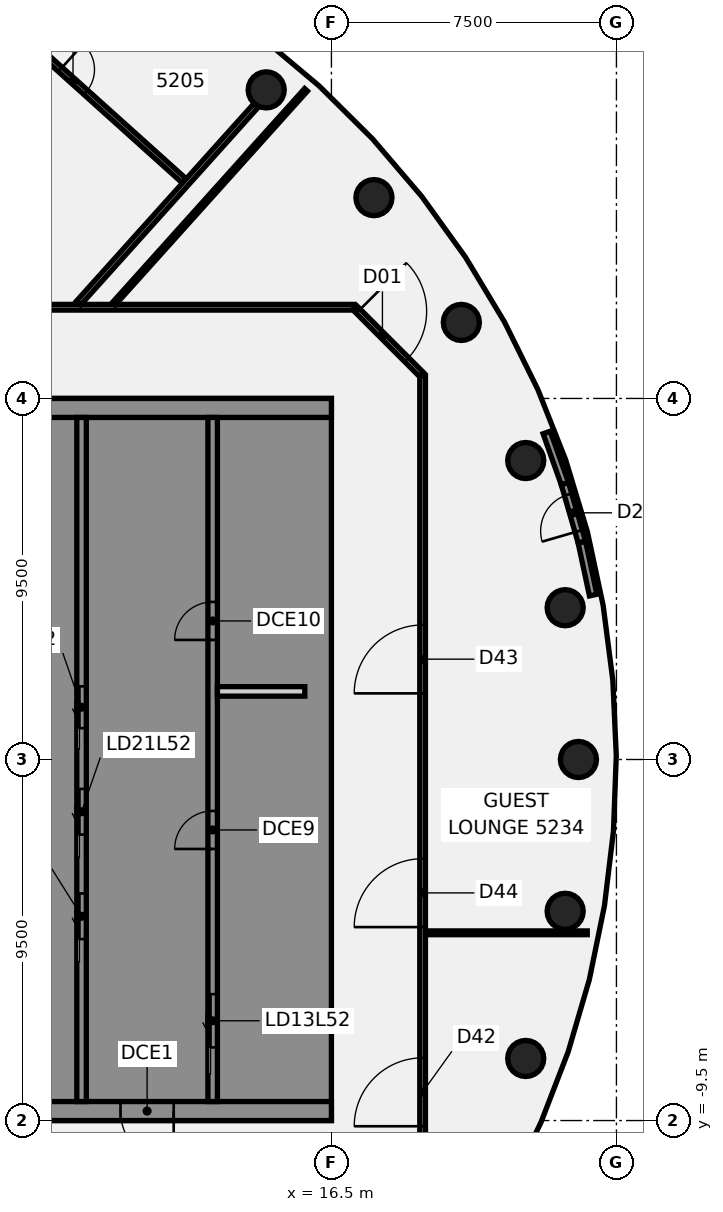
"""IFC4 building model, lengths in metres.
Left out: names, types, materials, properties, quantities, classifications, styles, units other than length and angle.
Written with IfcOpenShell. Run it as: python <this file> out.ifc"""

import sys

from ifc_helpers import new_model, si_unit, direction, frame, frame_2d, origin, origin_2d, place, context, subcontext, project, spatial, polyline, rectangle, circle, outline, extrude, element, fill, save


model = new_model("IFC4")
c1 = context("Model", 3, precision=1e-05, world=origin(), true_north=direction((0.0, 1.0)))
c2 = subcontext(c1, "Body", "Model", "MODEL_VIEW")
j1 = project(units=[si_unit("LENGTHUNIT", "METRE"), si_unit("PLANEANGLEUNIT", "RADIAN")], contexts=[c1])
p1 = place(None, origin())
s1 = spatial("IfcSite", under=j1, at=p1, CompositionType="ELEMENT")
p2 = place(p1, origin())
s2 = spatial("IfcBuilding", under=s1, at=p2, CompositionType="ELEMENT")
p3 = place(p2, frame((0.0, 0.0, 207.7)))
s3 = spatial("IfcBuildingStorey", under=s2, at=p3, CompositionType="ELEMENT", Elevation=207.7)
for number, where, z_axis, x_axis in (
    (1, (23.0, 0.0, -0.14), (0.0, 0.0, 1.0), (1.0, 0.0, 0.0)),
    (2, (22.651, 3.994, -0.14), (0.0, 0.0, 1.0), (1.0, 0.0, 0.0)),
    (3, (21.613, 7.866, -0.14), (0.0, 0.0, 1.0), (1.0, 0.0, 0.0)),
    (4, (19.919, 11.5, -0.14), (0.0, 0.0, 1.0), (1.0, 0.0, 0.0)),
    (5, (17.619, 14.784, -0.14), (0.0, 0.0, 1.0), (1.0, 0.0, 0.0)),
    (6, (14.784, 17.619, -0.14), (0.0, 0.0, 1.0), (1.0, 0.0, 0.0)),
    (7, (21.613, -7.866, -0.14), (0.0, 0.0, 1.0), (1.0, 0.0, 0.0)),
    (8, (22.651, -3.994, -0.14), (0.0, 0.0, 1.0), (1.0, 0.0, 0.0)),
):
    element("IfcColumn", number, at=place(p3, frame(where, z_axis=z_axis, x_axis=x_axis)), inside=s3, PredefinedType="COLUMN", context=c2, shape_type="SweptSolid", body=[
        extrude(circle(Radius=0.475, at=origin_2d()), origin(), (0.0, 0.0, 1.0), 3.6),
    ])
p4 = place(p3, frame((17.128, 11.872, 0.0), z_axis=(0.0, 0.0, 1.0), x_axis=(0.707106781187, -0.707106781187, 0.0)))
e9 = element("IfcWall", 9, at=p4, inside=s3, PredefinedType="PARTITIONING", context=c2, shape_type="SweptSolid", body=[
    extrude(rectangle(XDim=2.465, YDim=0.15, at=frame_2d((1.232, 0.0))), origin(), (0.0, 0.0, 1.0), 2.864),
])
p5 = place(p4, frame((0.11, 0.0, 0.0)))
e10 = element("IfcOpeningElement", 10, at=p5, cuts=e9, PredefinedType="OPENING", context=c2, shape_type="SweptSolid", body=[
    extrude(rectangle(XDim=1.8, YDim=2.1, at=frame_2d((0.9, 1.05))), frame((0.0, 0.085, 0.0), z_axis=(0.0, -1.0, 0.0), x_axis=(1.0, 0.0, 0.0)), (0.0, 0.0, 1.0), 0.17),
])
p6 = place(p3, frame((4.457, 22.567, 0.0), z_axis=(0.0, 0.0, 1.0), x_axis=(0.74382000742, -0.668379979175, 0.0)))
e11 = element("IfcWall", 11, at=p6, inside=s3, PredefinedType="PARTITIONING", context=c2, shape_type="SweptSolid", body=[
    extrude(rectangle(XDim=10.984, YDim=0.15, at=frame_2d((5.492, 0.0))), origin(), (0.0, 0.0, 1.0), 2.864),
])
p7 = place(p6, frame((6.6, 0.0, 0.0)))
e12 = element("IfcOpeningElement", 12, at=p7, cuts=e11, PredefinedType="OPENING", context=c2, shape_type="SweptSolid", body=[
    extrude(rectangle(XDim=0.9, YDim=2.1, at=frame_2d((0.45, 1.05))), frame((0.0, 0.085, 0.0), z_axis=(0.0, -1.0, 0.0), x_axis=(1.0, 0.0, 0.0)), (0.0, 0.0, 1.0), 0.17),
])
p8 = place(p3, frame((-17.065, 11.9, 0.0), z_axis=(0.0, 0.0, 1.0), x_axis=(1.0, 0.0, 0.0)))
e13 = element("IfcWall", 13, at=p8, inside=s3, PredefinedType="PARTITIONING", context=c2, shape_type="SweptSolid", body=[
    extrude(rectangle(XDim=34.165, YDim=0.15, at=frame_2d((17.083, 0.0))), origin(), (0.0, 0.0, 1.0), 2.864),
])
p9 = place(p8, frame((24.119, 0.0, 0.0)))
e14 = element("IfcOpeningElement", 14, at=p9, cuts=e13, PredefinedType="OPENING", context=c2, shape_type="SweptSolid", body=[
    extrude(rectangle(XDim=1.8, YDim=2.1, at=frame_2d((0.9, 1.05))), frame((0.0, 0.085, 0.0), z_axis=(0.0, -1.0, 0.0), x_axis=(1.0, 0.0, 0.0)), (0.0, 0.0, 1.0), 0.17),
])
p10 = place(p8, frame((8.918, 0.0, 0.0)))
e15 = element("IfcOpeningElement", 15, at=p10, cuts=e13, PredefinedType="OPENING", context=c2, shape_type="SweptSolid", body=[
    extrude(rectangle(XDim=1.8, YDim=2.1, at=frame_2d((0.9, 1.05))), frame((0.0, 0.085, 0.0), z_axis=(0.0, -1.0, 0.0), x_axis=(1.0, 0.0, 0.0)), (0.0, 0.0, 1.0), 0.17),
])
p11 = place(p8, frame((2.918, 0.0, 0.0)))
e16 = element("IfcOpeningElement", 16, at=p11, cuts=e13, PredefinedType="OPENING", context=c2, shape_type="SweptSolid", body=[
    extrude(rectangle(XDim=1.8, YDim=2.1, at=frame_2d((0.9, 1.05))), frame((0.0, 0.085, 0.0), z_axis=(0.0, -1.0, 0.0), x_axis=(1.0, 0.0, 0.0)), (0.0, 0.0, 1.0), 0.17),
])
p12 = place(p3, frame((18.955, -4.56, 0.0), z_axis=(0.0, 0.0, 1.0), x_axis=(1.0, 0.0, 0.0)))
e17 = element("IfcWall", 17, at=p12, inside=s3, PredefinedType="PARTITIONING", context=c2, shape_type="SweptSolid", body=[
    extrude(rectangle(XDim=4.277, YDim=0.1, at=frame_2d((2.139, 0.0))), origin(), (0.0, 0.0, 1.0), 2.864),
])
p13 = place(p3, frame((10.772, 11.989, 0.0), z_axis=(0.0, 0.0, 1.0), x_axis=(0.66831410143, 0.743879198412, 0.0)))
e18 = element("IfcWall", 18, at=p13, inside=s3, PredefinedType="PARTITIONING", context=c2, shape_type="SweptSolid", body=[
    extrude(rectangle(XDim=7.57, YDim=0.1, at=frame_2d((3.785, 0.0))), origin(), (0.0, 0.0, 1.0), 2.864),
])
p14 = place(p3, frame((9.843, 12.008, 0.0), z_axis=(0.0, 0.0, 1.0), x_axis=(0.668361660756, 0.743836467533, 0.0)))
e19 = element("IfcWall", 19, at=p14, inside=s3, PredefinedType="PARTITIONING", context=c2, shape_type="SweptSolid", body=[
    extrude(rectangle(XDim=7.003, YDim=0.15, at=frame_2d((3.501, 0.0))), origin(), (0.0, 0.0, 1.0), 2.864),
])
p15 = place(p3, frame((18.9, -10.1, 0.0), z_axis=(0.0, 0.0, 1.0), x_axis=(0.0, 1.0, 0.0)))
e20 = element("IfcWall", 20, at=p15, inside=s3, PredefinedType="PARTITIONING", context=c2, shape_type="SweptSolid", body=[
    extrude(rectangle(XDim=20.2, YDim=0.15, at=frame_2d((10.1, 0.0))), origin(), (0.0, 0.0, 1.0), 2.864),
])
p16 = place(p15, frame((0.45, 0.0, 0.0)))
e21 = element("IfcOpeningElement", 21, at=p16, cuts=e20, PredefinedType="OPENING", context=c2, shape_type="SweptSolid", body=[
    extrude(rectangle(XDim=1.8, YDim=2.1, at=frame_2d((0.9, 1.05))), frame((0.0, 0.085, 0.0), z_axis=(0.0, -1.0, 0.0), x_axis=(1.0, 0.0, 0.0)), (0.0, 0.0, 1.0), 0.17),
])
p17 = place(p15, frame((11.84, 0.0, 0.0)))
e22 = element("IfcOpeningElement", 22, at=p17, cuts=e20, PredefinedType="OPENING", context=c2, shape_type="SweptSolid", body=[
    extrude(rectangle(XDim=1.8, YDim=2.1, at=frame_2d((0.9, 1.05))), frame((0.0, 0.085, 0.0), z_axis=(0.0, -1.0, 0.0), x_axis=(1.0, 0.0, 0.0)), (0.0, 0.0, 1.0), 0.17),
])
p18 = place(p15, frame((5.69, 0.0, 0.0)))
e23 = element("IfcOpeningElement", 23, at=p18, cuts=e20, PredefinedType="OPENING", context=c2, shape_type="SweptSolid", body=[
    extrude(rectangle(XDim=1.8, YDim=2.1, at=frame_2d((0.9, 1.05))), frame((0.0, 0.085, 0.0), z_axis=(0.0, -1.0, 0.0), x_axis=(1.0, 0.0, 0.0)), (0.0, 0.0, 1.0), 0.17),
])
p19 = place(p3, frame((23.388, 4.325, 0.0), z_axis=(0.0, 0.0, 1.0), x_axis=(-0.209564080512, 0.977794915184, 0.0)))
e24 = element("IfcWall", 24, at=p19, inside=s3, PredefinedType="SOLIDWALL", context=c2, shape_type="SweptSolid", body=[
    extrude(rectangle(XDim=1.429, YDim=0.2, at=frame_2d((0.715, 0.0))), origin(), (0.0, 0.0, 1.0), 3.46),
])
p20 = place(p3, frame((22.644, 7.259, 0.0), z_axis=(0.0, 0.0, 1.0), x_axis=(-0.335491776762, 0.942043134748, 0.0)))
e25 = element("IfcWall", 25, at=p20, inside=s3, PredefinedType="SOLIDWALL", context=c2, shape_type="SweptSolid", body=[
    extrude(rectangle(XDim=1.428, YDim=0.2, at=frame_2d((0.714, 0.0))), origin(), (0.0, 0.0, 1.0), 3.46),
])
p21 = place(p3, frame((23.089, 5.723, 0.0), z_axis=(0.0, 0.0, 1.0), x_axis=(-0.278428701077, 0.960456900864, 0.0)))
e26 = element("IfcWall", 26, at=p21, inside=s3, PredefinedType="SOLIDWALL", context=c2, shape_type="SweptSolid", body=[
    extrude(rectangle(XDim=1.599, YDim=0.2, at=frame_2d((0.8, 0.0))), origin(), (0.0, 0.0, 1.0), 3.46),
])
p22 = place(p21, frame((0.3, 0.0, 0.0)))
e27 = element("IfcOpeningElement", 27, at=p22, cuts=e26, PredefinedType="OPENING", context=c2, shape_type="SweptSolid", body=[
    extrude(rectangle(XDim=1.0, YDim=2.4, at=frame_2d((0.5, 1.2))), frame((0.0, 0.11, 0.0), z_axis=(0.0, -1.0, 0.0), x_axis=(1.0, 0.0, 0.0)), (0.0, 0.0, 1.0), 0.22),
])
p23 = place(p3, frame((16.5, -9.25, 0.0), z_axis=(0.0, 0.0, 1.0), x_axis=(-1.0, 0.0, 0.0)))
e28 = element("IfcWall", 28, at=p23, inside=s3, PredefinedType="SHEAR", context=c2, shape_type="SweptSolid", body=[
    extrude(rectangle(XDim=13.0, YDim=0.5, at=frame_2d((6.5, 0.0))), origin(), (0.0, 0.0, 1.0), 3.46),
])
p24 = place(p23, frame((4.15, 0.0, 0.0)))
e29 = element("IfcOpeningElement", 29, at=p24, cuts=e28, PredefinedType="OPENING", context=c2, shape_type="SweptSolid", body=[
    extrude(rectangle(XDim=1.4, YDim=2.1, at=frame_2d((0.7, 1.05))), frame((0.0, 0.26, 0.0), z_axis=(0.0, -1.0, 0.0), x_axis=(1.0, 0.0, 0.0)), (0.0, 0.0, 1.0), 0.52),
])
p25 = place(p23, frame((10.125, 0.0, 0.0)))
e30 = element("IfcOpeningElement", 30, at=p25, cuts=e28, PredefinedType="OPENING", context=c2, shape_type="SweptSolid", body=[
    extrude(rectangle(XDim=1.4, YDim=2.1, at=frame_2d((0.7, 1.05))), frame((0.0, 0.26, 0.0), z_axis=(0.0, -1.0, 0.0), x_axis=(1.0, 0.0, 0.0)), (0.0, 0.0, 1.0), 0.52),
])
p26 = place(p3, origin())
e31 = element("IfcWall", 31, at=p26, inside=s3, PredefinedType="SHEAR", context=c2, shape_type="SweptSolid", body=[
    extrude(outline(polyline([(13.5, -8.125), (13.5, -9.0), (16.0, -9.0), (16.5, -9.0), (16.5, 9.0), (16.0, 9.0), (13.5, 9.0), (13.5, 8.125), (16.0, 8.125), (16.0, 5.625), (13.5, 5.625), (13.5, 5.375), (16.0, 5.375), (16.0, -5.375), (13.5, -5.375), (13.5, -5.625), (16.0, -5.625), (16.0, -8.125), (13.5, -8.125)])), origin(), (0.0, 0.0, 1.0), 3.46),
])
p27 = place(p3, frame((16.5, 9.25, 0.0), z_axis=(0.0, 0.0, 1.0), x_axis=(-1.0, 0.0, 0.0)))
e32 = element("IfcWall", 32, at=p27, inside=s3, PredefinedType="SHEAR", context=c2, shape_type="SweptSolid", body=[
    extrude(rectangle(XDim=13.0, YDim=0.5, at=frame_2d((6.5, 0.0))), origin(), (0.0, 0.0, 1.0), 3.46),
])
p28 = place(p3, origin())
e33 = element("IfcWall", 33, at=p28, inside=s3, PredefinedType="SHEAR", context=c2, shape_type="SweptSolid", body=[
    extrude(outline(polyline([(9.8, -5.375), (7.5, -5.375), (7.5, -2.875), (9.8, -2.875), (9.8, -2.625), (7.5, -2.625), (7.5, -0.125), (9.8, -0.125), (9.8, 0.125), (7.5, 0.125), (7.5, 2.625), (9.8, 2.625), (9.8, 2.875), (7.5, 2.875), (7.5, 5.375), (9.8, 5.375), (9.8, 5.625), (7.5, 5.625), (7.5, 8.125), (9.8, 8.125), (9.8, 9.0), (7.5, 9.0), (7.25, 9.0), (7.25, -5.625), (7.5, -5.625), (9.8, -5.625), (9.8, -5.375)])), origin(), (0.0, 0.0, 1.0), 3.46),
])
p29 = place(p3, origin())
e34 = element("IfcWall", 34, at=p29, inside=s3, PredefinedType="SHEAR", context=c2, shape_type="SweptSolid", body=[
    extrude(outline(polyline([(7.5, -8.125), (7.5, -9.0), (9.8, -9.0), (9.8, -8.125), (9.8, -5.625), (9.55, -5.625), (9.55, -8.125), (7.5, -8.125)])), origin(), (0.0, 0.0, 1.0), 3.46),
])
p30 = place(p3, frame((13.375, -9.0, 0.0), z_axis=(0.0, 0.0, 1.0), x_axis=(0.0, 1.0, 0.0)))
e35 = element("IfcWall", 35, at=p30, inside=s3, PredefinedType="SHEAR", context=c2, shape_type="SweptSolid", body=[
    extrude(rectangle(XDim=18.0, YDim=0.25, at=frame_2d((9.0, 0.0))), origin(), (0.0, 0.0, 1.0), 3.46),
])
p31 = place(p30, frame((1.425, 0.0, 0.0)))
e36 = element("IfcOpeningElement", 36, at=p31, cuts=e35, PredefinedType="OPENING", context=c2, shape_type="SweptSolid", body=[
    extrude(rectangle(XDim=1.4, YDim=2.1, at=frame_2d((0.7, 1.05))), frame((0.0, 0.135, 0.0), z_axis=(0.0, -1.0, 0.0), x_axis=(1.0, 0.0, 0.0)), (0.0, 0.0, 1.0), 0.27),
])
p32 = place(p30, frame((6.646, 0.0, 0.0)))
e37 = element("IfcOpeningElement", 37, at=p32, cuts=e35, PredefinedType="OPENING", context=c2, shape_type="SweptSolid", body=[
    extrude(rectangle(XDim=1.0, YDim=2.1, at=frame_2d((0.5, 1.05))), frame((0.0, 0.135, 0.0), z_axis=(0.0, -1.0, 0.0), x_axis=(1.0, 0.0, 0.0)), (0.0, 0.0, 1.0), 0.27),
])
p33 = place(p30, frame((12.146, 0.0, 0.0)))
e38 = element("IfcOpeningElement", 38, at=p33, cuts=e35, PredefinedType="OPENING", context=c2, shape_type="SweptSolid", body=[
    extrude(rectangle(XDim=1.0, YDim=2.1, at=frame_2d((0.5, 1.05))), frame((0.0, 0.135, 0.0), z_axis=(0.0, -1.0, 0.0), x_axis=(1.0, 0.0, 0.0)), (0.0, 0.0, 1.0), 0.27),
])
p34 = place(p3, frame((9.925, -9.0, 0.0), z_axis=(0.0, 0.0, 1.0), x_axis=(0.0, 1.0, 0.0)))
e39 = element("IfcWall", 39, at=p34, inside=s3, PredefinedType="SHEAR", context=c2, shape_type="SweptSolid", body=[
    extrude(rectangle(XDim=18.0, YDim=0.25, at=frame_2d((9.0, 0.0))), origin(), (0.0, 0.0, 1.0), 3.46),
])
p35 = place(p34, frame((4.275, 0.0, 0.0)))
e40 = element("IfcOpeningElement", 40, at=p35, cuts=e39, PredefinedType="OPENING", context=c2, shape_type="SweptSolid", body=[
    extrude(rectangle(XDim=1.2, YDim=2.1, at=frame_2d((0.6, 1.05))), frame((0.0, 0.135, 0.0), z_axis=(0.0, -1.0, 0.0), x_axis=(1.0, 0.0, 0.0)), (0.0, 0.0, 1.0), 0.27),
])
p36 = place(p34, frame((7.025, 0.0, 0.0)))
e41 = element("IfcOpeningElement", 41, at=p36, cuts=e39, PredefinedType="OPENING", context=c2, shape_type="SweptSolid", body=[
    extrude(rectangle(XDim=1.2, YDim=2.1, at=frame_2d((0.6, 1.05))), frame((0.0, 0.135, 0.0), z_axis=(0.0, -1.0, 0.0), x_axis=(1.0, 0.0, 0.0)), (0.0, 0.0, 1.0), 0.27),
])
p37 = place(p34, frame((9.825, 0.0, 0.0)))
e42 = element("IfcOpeningElement", 42, at=p37, cuts=e39, PredefinedType="OPENING", context=c2, shape_type="SweptSolid", body=[
    extrude(rectangle(XDim=1.1, YDim=2.1, at=frame_2d((0.55, 1.05))), frame((0.0, 0.135, 0.0), z_axis=(0.0, -1.0, 0.0), x_axis=(1.0, 0.0, 0.0)), (0.0, 0.0, 1.0), 0.27),
])
p38 = place(p3, frame((15.8, 1.792, 0.0), z_axis=(0.0, 0.0, 1.0), x_axis=(-1.0, 0.0, 0.0)))
e43 = element("IfcWall", 43, at=p38, inside=s3, PredefinedType="PARTITIONING", context=c2, shape_type="SweptSolid", body=[
    extrude(rectangle(XDim=2.3, YDim=0.25, at=frame_2d((1.15, 0.0))), origin(), (0.0, 0.0, 1.0), 3.46),
])
p39 = place(p5, origin())
e44 = element("IfcDoor", 44, at=p39, inside=s3, OperationType="DOUBLE_DOOR_SINGLE_SWING", PredefinedType="DOOR", context=c2, shape_type="SweptSolid", body=[
    extrude(rectangle(XDim=1.8, YDim=2.1, at=frame_2d((0.9, 1.05))), frame((0.0, 0.025, 0.0), z_axis=(0.0, -1.0, 0.0), x_axis=(1.0, 0.0, 0.0)), (0.0, 0.0, 1.0), 0.05),
])
fill(e10, e44)
p40 = place(p7, origin())
e45 = element("IfcDoor", 45, at=p40, inside=s3, OperationType="SINGLE_SWING_LEFT", PredefinedType="DOOR", context=c2, shape_type="SweptSolid", body=[
    extrude(rectangle(XDim=0.9, YDim=2.1, at=frame_2d((0.45, 1.05))), frame((0.0, 0.025, 0.0), z_axis=(0.0, -1.0, 0.0), x_axis=(1.0, 0.0, 0.0)), (0.0, 0.0, 1.0), 0.05),
])
fill(e12, e45)
p41 = place(p16, frame((1.8, 0.0, 0.0), z_axis=(0.0, 0.0, 1.0), x_axis=(-1.0, 0.0, 0.0)))
e46 = element("IfcDoor", 46, at=p41, inside=s3, OperationType="DOUBLE_DOOR_SINGLE_SWING", PredefinedType="DOOR", context=c2, shape_type="SweptSolid", body=[
    extrude(rectangle(XDim=1.8, YDim=2.1, at=frame_2d((0.9, 1.05))), frame((0.0, 0.025, 0.0), z_axis=(0.0, -1.0, 0.0), x_axis=(1.0, 0.0, 0.0)), (0.0, 0.0, 1.0), 0.05),
])
fill(e21, e46)
p42 = place(p17, frame((1.8, 0.0, 0.0), z_axis=(0.0, 0.0, 1.0), x_axis=(-1.0, 0.0, 0.0)))
e47 = element("IfcDoor", 47, at=p42, inside=s3, OperationType="DOUBLE_DOOR_SINGLE_SWING", PredefinedType="DOOR", context=c2, shape_type="SweptSolid", body=[
    extrude(rectangle(XDim=1.8, YDim=2.1, at=frame_2d((0.9, 1.05))), frame((0.0, 0.025, 0.0), z_axis=(0.0, -1.0, 0.0), x_axis=(1.0, 0.0, 0.0)), (0.0, 0.0, 1.0), 0.05),
])
fill(e22, e47)
p43 = place(p18, frame((1.8, 0.0, 0.0), z_axis=(0.0, 0.0, 1.0), x_axis=(-1.0, 0.0, 0.0)))
e48 = element("IfcDoor", 48, at=p43, inside=s3, OperationType="DOUBLE_DOOR_SINGLE_SWING", PredefinedType="DOOR", context=c2, shape_type="SweptSolid", body=[
    extrude(rectangle(XDim=1.8, YDim=2.1, at=frame_2d((0.9, 1.05))), frame((0.0, 0.025, 0.0), z_axis=(0.0, -1.0, 0.0), x_axis=(1.0, 0.0, 0.0)), (0.0, 0.0, 1.0), 0.05),
])
fill(e23, e48)
p44 = place(p22, origin())
e49 = element("IfcDoor", 49, at=p44, inside=s3, OperationType="SINGLE_SWING_LEFT", PredefinedType="DOOR", context=c2, shape_type="SweptSolid", body=[
    extrude(rectangle(XDim=1.0, YDim=2.4, at=frame_2d((0.5, 1.2))), frame((0.0, 0.025, 0.0), z_axis=(0.0, -1.0, 0.0), x_axis=(1.0, 0.0, 0.0)), (0.0, 0.0, 1.0), 0.05),
])
fill(e27, e49)
p45 = place(p24, origin())
e50 = element("IfcDoor", 50, at=p45, inside=s3, OperationType="SINGLE_SWING_LEFT", PredefinedType="DOOR", context=c2, shape_type="SweptSolid", body=[
    extrude(rectangle(XDim=1.4, YDim=2.1, at=frame_2d((0.7, 1.05))), frame((0.0, 0.025, 0.0), z_axis=(0.0, -1.0, 0.0), x_axis=(1.0, 0.0, 0.0)), (0.0, 0.0, 1.0), 0.05),
])
fill(e29, e50)
p46 = place(p31, origin())
e51 = element("IfcDoor", 51, at=p46, inside=s3, OperationType="SLIDING_TO_LEFT", PredefinedType="DOOR", context=c2, shape_type="SweptSolid", body=[
    extrude(rectangle(XDim=1.4, YDim=2.1, at=frame_2d((0.7, 1.05))), frame((0.0, 0.025, 0.0), z_axis=(0.0, -1.0, 0.0), x_axis=(1.0, 0.0, 0.0)), (0.0, 0.0, 1.0), 0.05),
])
fill(e36, e51)
p47 = place(p35, origin())
e52 = element("IfcDoor", 52, at=p47, inside=s3, OperationType="SLIDING_TO_LEFT", PredefinedType="DOOR", context=c2, shape_type="SweptSolid", body=[
    extrude(rectangle(XDim=1.2, YDim=2.1, at=frame_2d((0.6, 1.05))), frame((0.0, 0.025, 0.0), z_axis=(0.0, -1.0, 0.0), x_axis=(1.0, 0.0, 0.0)), (0.0, 0.0, 1.0), 0.05),
])
fill(e40, e52)
p48 = place(p36, origin())
e53 = element("IfcDoor", 53, at=p48, inside=s3, OperationType="SLIDING_TO_LEFT", PredefinedType="DOOR", context=c2, shape_type="SweptSolid", body=[
    extrude(rectangle(XDim=1.2, YDim=2.1, at=frame_2d((0.6, 1.05))), frame((0.0, 0.025, 0.0), z_axis=(0.0, -1.0, 0.0), x_axis=(1.0, 0.0, 0.0)), (0.0, 0.0, 1.0), 0.05),
])
fill(e41, e53)
p49 = place(p37, origin())
e54 = element("IfcDoor", 54, at=p49, inside=s3, OperationType="SLIDING_TO_LEFT", PredefinedType="DOOR", context=c2, shape_type="SweptSolid", body=[
    extrude(rectangle(XDim=1.1, YDim=2.1, at=frame_2d((0.55, 1.05))), frame((0.0, 0.025, 0.0), z_axis=(0.0, -1.0, 0.0), x_axis=(1.0, 0.0, 0.0)), (0.0, 0.0, 1.0), 0.05),
])
fill(e42, e54)
p50 = place(p32, origin())
e55 = element("IfcDoor", 55, at=p50, inside=s3, OperationType="SINGLE_SWING_LEFT", PredefinedType="DOOR", context=c2, shape_type="SweptSolid", body=[
    extrude(rectangle(XDim=1.0, YDim=2.1, at=frame_2d((0.5, 1.05))), frame((0.0, 0.025, 0.0), z_axis=(0.0, -1.0, 0.0), x_axis=(1.0, 0.0, 0.0)), (0.0, 0.0, 1.0), 0.05),
])
fill(e37, e55)
p51 = place(p33, origin())
e56 = element("IfcDoor", 56, at=p51, inside=s3, OperationType="SINGLE_SWING_LEFT", PredefinedType="DOOR", context=c2, shape_type="SweptSolid", body=[
    extrude(rectangle(XDim=1.0, YDim=2.1, at=frame_2d((0.5, 1.05))), frame((0.0, 0.025, 0.0), z_axis=(0.0, -1.0, 0.0), x_axis=(1.0, 0.0, 0.0)), (0.0, 0.0, 1.0), 0.05),
])
fill(e38, e56)
save(model, sys.argv[1])
